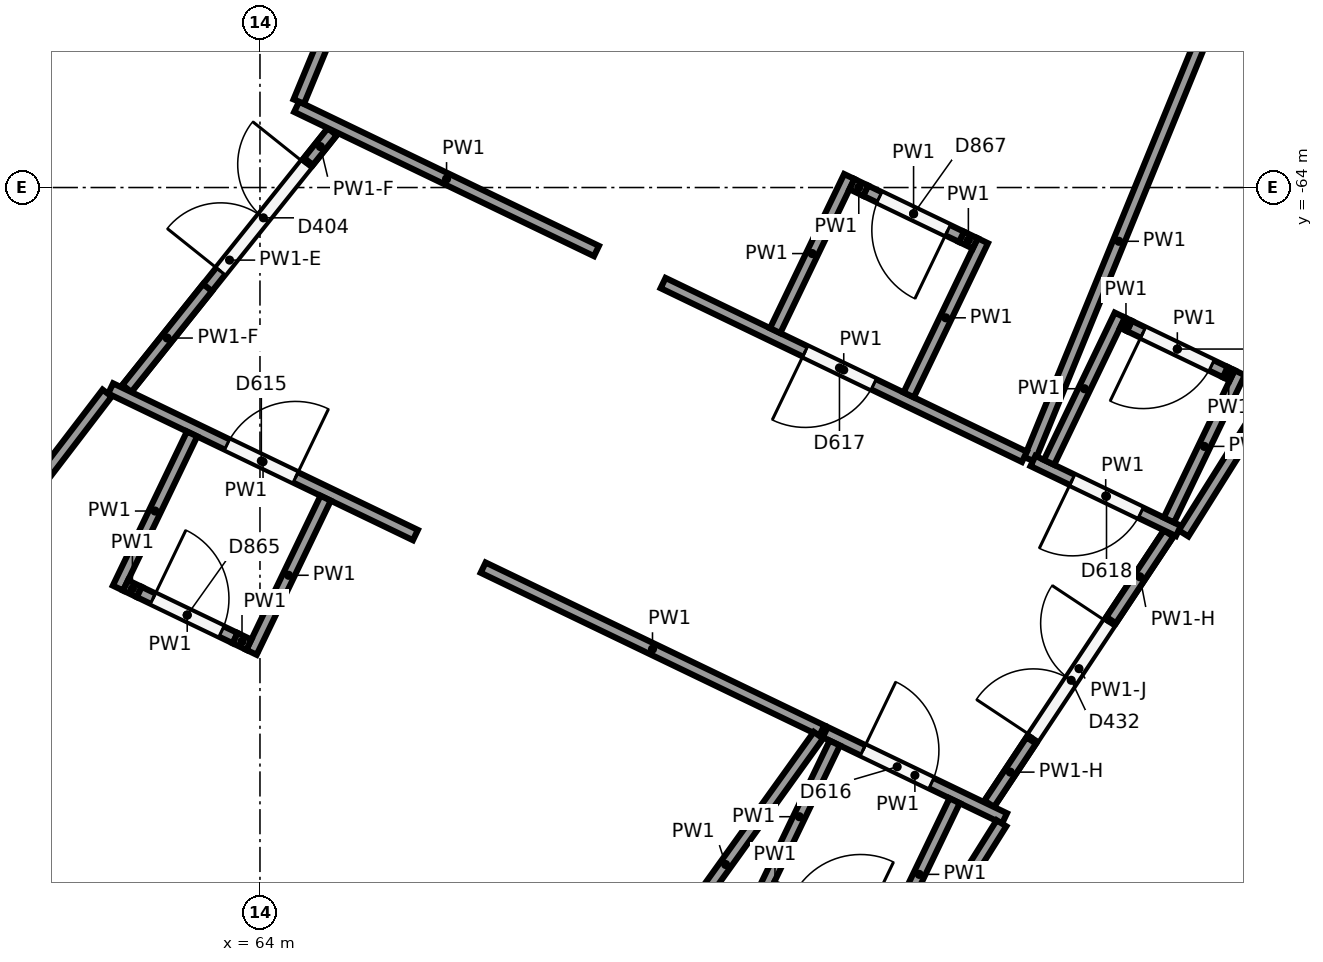
"""IFC4 building model, lengths in metres.
Left out: names, types, materials, properties, quantities, classifications, styles, units other than length and angle.
Written with IfcOpenShell. Run it as: python <this file> out.ifc"""

import sys

from ifc_helpers import new_model, si_unit, direction, frame, frame_2d, origin, origin_2d, place, context, subcontext, project, spatial, rectangle, circle, extrude, element, fill, save


model = new_model("IFC4")
c1 = context("Model", 3, precision=1e-05, world=origin(), true_north=direction((0.0, 1.0)))
c2 = subcontext(c1, "Body", "Model", "MODEL_VIEW")
j1 = project(units=[si_unit("LENGTHUNIT", "METRE"), si_unit("PLANEANGLEUNIT", "RADIAN")], contexts=[c1])
p1 = place(None, origin())
s1 = spatial("IfcSite", under=j1, at=p1, CompositionType="ELEMENT")
p2 = place(p1, origin())
s2 = spatial("IfcBuilding", under=s1, at=p2, CompositionType="ELEMENT")
p3 = place(p2, origin())
s3 = spatial("IfcBuildingStorey", under=s2, at=p3, CompositionType="ELEMENT", Elevation=0.0)
for number, where, z_axis, x_axis in (
    (1, (63.068, -73.47, 0.0), (0.0, 0.0, 1.0), (1.0, 0.0, 0.0)),
    (2, (67.972, -67.058, 0.0), (0.0, 0.0, 1.0), (1.0, 0.0, 0.0)),
):
    element("IfcColumn", number, at=place(p3, frame(where, z_axis=z_axis, x_axis=x_axis)), inside=s3, PredefinedType="COLUMN", context=c2, shape_type="SweptSolid", body=[
        extrude(circle(Radius=0.45, at=origin_2d()), origin(), (0.0, 0.0, 1.0), 6.5),
    ])
p4 = place(p3, frame((62.035, -66.644, 0.0), z_axis=(0.0, 0.0, 1.0), x_axis=(0.901212042365, -0.43337841974, 0.0)))
e3 = element("IfcWall", 3, at=p4, inside=s3, PredefinedType="PARTITIONING", context=c2, shape_type="SweptSolid", body=[
    extrude(rectangle(XDim=4.45, YDim=0.15, at=frame_2d((2.225, 0.0))), origin(), (0.0, 0.0, 1.0), 6.15),
])
p5 = place(p4, frame((1.7, 0.0, 0.0)))
e4 = element("IfcOpeningElement", 4, at=p5, cuts=e3, PredefinedType="OPENING", context=c2, shape_type="SweptSolid", body=[
    extrude(rectangle(XDim=1.0, YDim=2.1, at=frame_2d((0.5, 1.05))), frame((0.0, 0.085, 0.0), z_axis=(0.0, -1.0, 0.0), x_axis=(1.0, 0.0, 0.0)), (0.0, 0.0, 1.0), 0.17),
])
p6 = place(p3, frame((66.937, -69.001, 0.0), z_axis=(0.0, 0.0, 1.0), x_axis=(0.901185296762, -0.433434032928, 0.0)))
e5 = element("IfcWall", 5, at=p6, inside=s3, PredefinedType="PARTITIONING", context=c2, shape_type="SweptSolid", body=[
    extrude(rectangle(XDim=4.944, YDim=0.15, at=frame_2d((2.472, 0.0))), origin(), (0.0, 0.0, 1.0), 6.15),
])
p7 = place(p3, frame((71.348, -71.206, 0.0), z_axis=(0.0, 0.0, 1.0), x_axis=(-0.583304436704, -0.812253614409, 0.0)))
e6 = element("IfcWall", 6, at=p7, inside=s3, PredefinedType="PARTITIONING", context=c2, shape_type="SweptSolid", body=[
    extrude(rectangle(XDim=4.188, YDim=0.15, at=frame_2d((2.094, 0.0))), origin(), (0.0, 0.0, 1.0), 6.15),
])
p8 = place(p3, frame((59.225, -70.318, 0.0), z_axis=(0.0, 0.0, 1.0), x_axis=(0.607503889775, 0.794316702523, 0.0)))
e7 = element("IfcWall", 7, at=p8, inside=s3, PredefinedType="PARTITIONING", context=c2, shape_type="SweptSolid", body=[
    extrude(rectangle(XDim=4.549, YDim=0.15, at=frame_2d((2.275, 0.0))), origin(), (0.0, 0.0, 1.0), 6.15),
])
p9 = place(p3, frame((71.437, -71.165, 0.0), z_axis=(0.0, 0.0, 1.0), x_axis=(0.901204092293, -0.433394951556, 0.0)))
e8 = element("IfcWall", 8, at=p9, inside=s3, PredefinedType="PARTITIONING", context=c2, shape_type="SweptSolid", body=[
    extrude(rectangle(XDim=2.618, YDim=0.15, at=frame_2d((1.309, 0.0))), origin(), (0.0, 0.0, 1.0), 6.15),
])
p10 = place(p9, frame((0.55, 0.0, 0.0)))
e9 = element("IfcOpeningElement", 9, at=p10, cuts=e8, PredefinedType="OPENING", context=c2, shape_type="SweptSolid", body=[
    extrude(rectangle(XDim=1.0, YDim=2.1, at=frame_2d((0.5, 1.05))), frame((0.0, 0.085, 0.0), z_axis=(0.0, -1.0, 0.0), x_axis=(1.0, 0.0, 0.0)), (0.0, 0.0, 1.0), 0.17),
])
p11 = place(p3, frame((73.756, -72.364, 0.0), z_axis=(0.0, 0.0, 1.0), x_axis=(-0.532054374811, -0.846710187871, 0.0)))
e10 = element("IfcWall", 10, at=p11, inside=s3, PredefinedType="PARTITIONING", context=c2, shape_type="SweptSolid", body=[
    extrude(rectangle(XDim=2.731, YDim=0.15, at=frame_2d((1.366, 0.0))), origin(), (0.0, 0.0, 1.0), 6.15),
])
p12 = place(p3, frame((76.476, -61.839, 0.0), z_axis=(0.0, 0.0, 1.0), x_axis=(-0.3791112098, -0.92535111747, 0.0)))
e11 = element("IfcWall", 11, at=p12, inside=s3, PredefinedType="PARTITIONING", context=c2, shape_type="SweptSolid", body=[
    extrude(rectangle(XDim=6.2, YDim=0.15, at=frame_2d((3.1, 0.0))), origin(), (0.0, 0.0, 1.0), 6.15),
])
p13 = place(p3, frame((74.058, -67.543, 0.0), z_axis=(0.0, 0.0, 1.0), x_axis=(-0.90118985402, 0.433424557462, 0.0)))
e12 = element("IfcWall", 12, at=p13, inside=s3, PredefinedType="PARTITIONING", context=c2, shape_type="SweptSolid", body=[
    extrude(rectangle(XDim=5.275, YDim=0.15, at=frame_2d((2.638, 0.0))), origin(), (0.0, 0.0, 1.0), 6.15),
])
p14 = place(p13, frame((2.2, 0.0, 0.0)))
e13 = element("IfcOpeningElement", 13, at=p14, cuts=e12, PredefinedType="OPENING", context=c2, shape_type="SweptSolid", body=[
    extrude(rectangle(XDim=1.0, YDim=2.1, at=frame_2d((0.5, 1.05))), frame((0.0, 0.085, 0.0), z_axis=(0.0, -1.0, 0.0), x_axis=(1.0, 0.0, 0.0)), (0.0, 0.0, 1.0), 0.17),
])
p15 = place(p3, frame((68.427, -64.835, 0.0), z_axis=(0.0, 0.0, 1.0), x_axis=(-0.901214723888, 0.433372843459, 0.0)))
e14 = element("IfcWall", 14, at=p15, inside=s3, PredefinedType="PARTITIONING", context=c2, shape_type="SweptSolid", body=[
    extrude(rectangle(XDim=4.377, YDim=0.15, at=frame_2d((2.188, 0.0))), origin(), (0.0, 0.0, 1.0), 6.15),
])
p16 = place(p3, frame((64.511, -62.869, 0.0), z_axis=(0.0, 0.0, 1.0), x_axis=(0.382677430763, 0.923882018433, 0.0)))
e15 = element("IfcWall", 15, at=p16, inside=s3, PredefinedType="PARTITIONING", context=c2, shape_type="SweptSolid", body=[
    extrude(rectangle(XDim=4.591, YDim=0.15, at=frame_2d((2.295, 0.0))), origin(), (0.0, 0.0, 1.0), 6.15),
])
p17 = place(p3, frame((79.605, -63.055, 0.0), z_axis=(0.0, 0.0, 1.0), x_axis=(-0.532032873767, -0.846723698281, 0.0)))
e16 = element("IfcWall", 16, at=p17, inside=s3, PredefinedType="PARTITIONING", context=c2, shape_type="SweptSolid", body=[
    extrude(rectangle(XDim=6.49, YDim=0.15, at=frame_2d((3.245, 0.0))), origin(), (0.0, 0.0, 1.0), 6.15),
])
p18 = place(p3, frame((76.084, -68.518, 0.0), z_axis=(0.0, 0.0, 1.0), x_axis=(-0.901196299468, 0.433411155631, 0.0)))
e17 = element("IfcWall", 17, at=p18, inside=s3, PredefinedType="PARTITIONING", context=c2, shape_type="SweptSolid", body=[
    extrude(rectangle(XDim=2.124, YDim=0.15, at=frame_2d((1.062, 0.0))), origin(), (0.0, 0.0, 1.0), 6.15),
])
p19 = place(p18, frame((0.55, 0.0, 0.0)))
e18 = element("IfcOpeningElement", 18, at=p19, cuts=e17, PredefinedType="OPENING", context=c2, shape_type="SweptSolid", body=[
    extrude(rectangle(XDim=1.0, YDim=2.1, at=frame_2d((0.5, 1.05))), frame((0.0, 0.085, 0.0), z_axis=(0.0, -1.0, 0.0), x_axis=(1.0, 0.0, 0.0)), (0.0, 0.0, 1.0), 0.17),
])
p20 = place(p3, frame((63.107, -67.242, 0.0), z_axis=(0.0, 0.0, 1.0), x_axis=(-0.433358837747, -0.90122145877, 0.0)))
e19 = element("IfcWall", 19, at=p20, inside=s3, PredefinedType="PARTITIONING", context=c2, shape_type="SweptSolid", body=[
    extrude(rectangle(XDim=2.25, YDim=0.15, at=frame_2d((1.125, 0.0))), origin(), (0.0, 0.0, 1.0), 6.15),
])
p21 = place(p3, frame((64.864, -68.087, 0.0), z_axis=(0.0, 0.0, 1.0), x_axis=(-0.433401217297, -0.901201079031, 0.0)))
e20 = element("IfcWall", 20, at=p21, inside=s3, PredefinedType="PARTITIONING", context=c2, shape_type="SweptSolid", body=[
    extrude(rectangle(XDim=2.25, YDim=0.15, at=frame_2d((1.125, 0.0))), origin(), (0.0, 0.0, 1.0), 6.15),
])
p22 = place(p3, frame((62.232, -69.235, 0.0), z_axis=(0.0, 0.0, 1.0), x_axis=(0.901160703759, -0.433485162377, 0.0)))
e21 = element("IfcWall", 21, at=p22, inside=s3, PredefinedType="PARTITIONING", context=c2, shape_type="SweptSolid", body=[
    extrude(rectangle(XDim=0.2, YDim=0.15, at=frame_2d((0.1, 0.0))), origin(), (0.0, 0.0, 1.0), 6.15),
])
p23 = place(p3, frame((62.412, -69.322, 0.0), z_axis=(0.0, 0.0, 1.0), x_axis=(0.901226230947, -0.433348913294, 0.0)))
e22 = element("IfcWall", 22, at=p23, inside=s3, PredefinedType="PARTITIONING", context=c2, shape_type="SweptSolid", body=[
    extrude(rectangle(XDim=1.4, YDim=0.15, at=frame_2d((0.7, 0.0))), origin(), (0.0, 0.0, 1.0), 6.15),
])
p24 = place(p23, frame((0.2, 0.0, 0.0)))
e23 = element("IfcOpeningElement", 23, at=p24, cuts=e22, PredefinedType="OPENING", context=c2, shape_type="SweptSolid", body=[
    extrude(rectangle(XDim=1.0, YDim=2.1, at=frame_2d((0.5, 1.05))), frame((0.0, 0.085, 0.0), z_axis=(0.0, -1.0, 0.0), x_axis=(1.0, 0.0, 0.0)), (0.0, 0.0, 1.0), 0.17),
])
p25 = place(p3, frame((63.674, -69.928, 0.0), z_axis=(0.0, 0.0, 1.0), x_axis=(0.901160703759, -0.433485162377, 0.0)))
e24 = element("IfcWall", 24, at=p25, inside=s3, PredefinedType="PARTITIONING", context=c2, shape_type="SweptSolid", body=[
    extrude(rectangle(XDim=0.2, YDim=0.15, at=frame_2d((0.1, 0.0))), origin(), (0.0, 0.0, 1.0), 6.15),
])
for number, where, z_axis, x_axis in (
    (25, (71.562, -71.309, 0.0), (0.0, 0.0, 1.0), (-0.433, -0.901, 0.0)),
    (26, (73.14, -72.067, 0.0), (0.0, 0.0, 1.0), (-0.433, -0.901, 0.0)),
):
    element("IfcWall", number, at=place(p3, frame(where, z_axis=z_axis, x_axis=x_axis)), inside=s3, PredefinedType="PARTITIONING", context=c2, shape_type="SweptSolid", body=[
        extrude(rectangle(XDim=2.15, YDim=0.15, at=frame_2d((1.075, 0.0))), origin(), (0.0, 0.0, 1.0), 6.15),
    ])
p26 = place(p3, frame((70.731, -73.211, 0.0), z_axis=(0.0, 0.0, 1.0), x_axis=(0.900683407008, -0.434476006633, 0.0)))
e27 = element("IfcWall", 27, at=p26, inside=s3, PredefinedType="PARTITIONING", context=c2, shape_type="SweptSolid", body=[
    extrude(rectangle(XDim=0.1, YDim=0.15, at=frame_2d((0.05, 0.0))), origin(), (0.0, 0.0, 1.0), 6.15),
])
p27 = place(p3, frame((72.535, -66.728, 0.0), z_axis=(0.0, 0.0, 1.0), x_axis=(0.433401217297, 0.901201079031, 0.0)))
e28 = element("IfcWall", 28, at=p27, inside=s3, PredefinedType="PARTITIONING", context=c2, shape_type="SweptSolid", body=[
    extrude(rectangle(XDim=2.25, YDim=0.15, at=frame_2d((1.125, 0.0))), origin(), (0.0, 0.0, 1.0), 6.15),
])
p28 = place(p3, frame((70.778, -65.883, 0.0), z_axis=(0.0, 0.0, 1.0), x_axis=(0.433446957245, 0.901179080569, 0.0)))
e29 = element("IfcWall", 29, at=p28, inside=s3, PredefinedType="PARTITIONING", context=c2, shape_type="SweptSolid", body=[
    extrude(rectangle(XDim=2.25, YDim=0.15, at=frame_2d((1.125, 0.0))), origin(), (0.0, 0.0, 1.0), 6.15),
])
p29 = place(p3, frame((73.41, -64.735, 0.0), z_axis=(0.0, 0.0, 1.0), x_axis=(-0.901160703759, 0.433485162377, 0.0)))
e30 = element("IfcWall", 30, at=p29, inside=s3, PredefinedType="PARTITIONING", context=c2, shape_type="SweptSolid", body=[
    extrude(rectangle(XDim=0.2, YDim=0.15, at=frame_2d((0.1, 0.0))), origin(), (0.0, 0.0, 1.0), 6.15),
])
p30 = place(p3, frame((73.23, -64.649, 0.0), z_axis=(0.0, 0.0, 1.0), x_axis=(-0.901158119361, 0.433490534971, 0.0)))
e31 = element("IfcWall", 31, at=p30, inside=s3, PredefinedType="PARTITIONING", context=c2, shape_type="SweptSolid", body=[
    extrude(rectangle(XDim=1.4, YDim=0.15, at=frame_2d((0.7, 0.0))), origin(), (0.0, 0.0, 1.0), 6.15),
])
p31 = place(p30, frame((0.2, 0.0, 0.0)))
e32 = element("IfcOpeningElement", 32, at=p31, cuts=e31, PredefinedType="OPENING", context=c2, shape_type="SweptSolid", body=[
    extrude(rectangle(XDim=1.0, YDim=2.1, at=frame_2d((0.5, 1.05))), frame((0.0, 0.085, 0.0), z_axis=(0.0, -1.0, 0.0), x_axis=(1.0, 0.0, 0.0)), (0.0, 0.0, 1.0), 0.17),
])
p32 = place(p3, frame((71.969, -64.042, 0.0), z_axis=(0.0, 0.0, 1.0), x_axis=(-0.901160703759, 0.433485162377, 0.0)))
e33 = element("IfcWall", 33, at=p32, inside=s3, PredefinedType="PARTITIONING", context=c2, shape_type="SweptSolid", body=[
    extrude(rectangle(XDim=0.2, YDim=0.15, at=frame_2d((0.1, 0.0))), origin(), (0.0, 0.0, 1.0), 6.15),
])
for number, where, z_axis, x_axis in (
    (34, (75.959, -68.375, 0.0), (0.0, 0.0, 1.0), (0.433, 0.901, 0.0)),
    (35, (74.382, -67.616, 0.0), (0.0, 0.0, 1.0), (0.433, 0.901, 0.0)),
):
    element("IfcWall", number, at=place(p3, frame(where, z_axis=z_axis, x_axis=x_axis)), inside=s3, PredefinedType="PARTITIONING", context=c2, shape_type="SweptSolid", body=[
        extrude(rectangle(XDim=2.15, YDim=0.15, at=frame_2d((1.075, 0.0))), origin(), (0.0, 0.0, 1.0), 6.15),
    ])
p33 = place(p3, frame((76.791, -66.472, 0.0), z_axis=(0.0, 0.0, 1.0), x_axis=(-0.900683407008, 0.434476006633, 0.0)))
e36 = element("IfcWall", 36, at=p33, inside=s3, PredefinedType="PARTITIONING", context=c2, shape_type="SweptSolid", body=[
    extrude(rectangle(XDim=0.1, YDim=0.15, at=frame_2d((0.05, 0.0))), origin(), (0.0, 0.0, 1.0), 6.15),
])
p34 = place(p3, frame((76.701, -66.428, 0.0), z_axis=(0.0, 0.0, 1.0), x_axis=(-0.901226230947, 0.433348913294, 0.0)))
e37 = element("IfcWall", 37, at=p34, inside=s3, PredefinedType="PARTITIONING", context=c2, shape_type="SweptSolid", body=[
    extrude(rectangle(XDim=1.4, YDim=0.15, at=frame_2d((0.7, 0.0))), origin(), (0.0, 0.0, 1.0), 6.15),
])
p35 = place(p34, frame((0.2, 0.0, 0.0)))
e38 = element("IfcOpeningElement", 38, at=p35, cuts=e37, PredefinedType="OPENING", context=c2, shape_type="SweptSolid", body=[
    extrude(rectangle(XDim=1.0, YDim=2.1, at=frame_2d((0.5, 1.05))), frame((0.0, 0.085, 0.0), z_axis=(0.0, -1.0, 0.0), x_axis=(1.0, 0.0, 0.0)), (0.0, 0.0, 1.0), 0.17),
])
p36 = place(p3, frame((75.439, -65.822, 0.0), z_axis=(0.0, 0.0, 1.0), x_axis=(-0.900683407008, 0.434476006633, 0.0)))
e39 = element("IfcWall", 39, at=p36, inside=s3, PredefinedType="PARTITIONING", context=c2, shape_type="SweptSolid", body=[
    extrude(rectangle(XDim=0.1, YDim=0.15, at=frame_2d((0.05, 0.0))), origin(), (0.0, 0.0, 1.0), 6.15),
])
p37 = place(p3, frame((73.595, -72.108, 0.0), z_axis=(0.0, 0.0, 1.0), x_axis=(0.552890314707, 0.833254042837, 0.0)))
e40 = element("IfcWall", 40, at=p37, inside=s3, PredefinedType="PARTITIONING", context=c2, shape_type="SweptSolid", body=[
    extrude(rectangle(XDim=4.268, YDim=0.15, at=frame_2d((2.134, 0.0))), origin(), (0.0, 0.0, 1.0), 5.05),
])
p38 = place(p37, frame((1.05, 0.0, 0.0)))
e41 = element("IfcOpeningElement", 41, at=p38, cuts=e40, PredefinedType="OPENING", context=c2, shape_type="SweptSolid", body=[
    extrude(rectangle(XDim=1.8, YDim=2.1, at=frame_2d((0.9, 1.05))), frame((0.0, 0.085, 0.0), z_axis=(0.0, -1.0, 0.0), x_axis=(1.0, 0.0, 0.0)), (0.0, 0.0, 1.0), 0.17),
])
p39 = place(p3, frame((73.595, -72.108, 5.05), z_axis=(0.0, 0.0, 1.0), x_axis=(0.552782992552, 0.833325244514, 0.0)))
e42 = element("IfcWall", 42, at=p39, inside=s3, PredefinedType="PARTITIONING", context=c2, shape_type="SweptSolid", body=[
    extrude(rectangle(XDim=1.0, YDim=0.15, at=frame_2d((0.5, 0.0))), origin(), (0.0, 0.0, 1.0), 1.1),
])
p40 = place(p3, frame((75.199, -69.691, 5.05), z_axis=(0.0, 0.0, 1.0), x_axis=(0.552845063211, 0.833284066861, 0.0)))
e43 = element("IfcWall", 43, at=p40, inside=s3, PredefinedType="PARTITIONING", context=c2, shape_type="SweptSolid", body=[
    extrude(rectangle(XDim=1.368, YDim=0.15, at=frame_2d((0.684, 0.0))), origin(), (0.0, 0.0, 1.0), 1.1),
])
p41 = place(p3, frame((62.249, -66.644, 0.0), z_axis=(0.0, 0.0, 1.0), x_axis=(0.624681279042, 0.780879824054, 0.0)))
e44 = element("IfcWall", 44, at=p41, inside=s3, PredefinedType="PARTITIONING", context=c2, shape_type="SweptSolid", body=[
    extrude(rectangle(XDim=4.325, YDim=0.15, at=frame_2d((2.163, 0.0))), origin(), (0.0, 0.0, 1.0), 5.25),
])
p42 = place(p41, frame((1.975, 0.0, 0.0)))
e45 = element("IfcOpeningElement", 45, at=p42, cuts=e44, PredefinedType="OPENING", context=c2, shape_type="SweptSolid", body=[
    extrude(rectangle(XDim=1.8, YDim=2.1, at=frame_2d((0.9, 1.05))), frame((0.0, 0.085, 0.0), z_axis=(0.0, -1.0, 0.0), x_axis=(1.0, 0.0, 0.0)), (0.0, 0.0, 1.0), 0.17),
])
p43 = place(p3, frame((64.638, -63.657, 5.25), z_axis=(0.0, 0.0, 1.0), x_axis=(0.624635487442, 0.780916453808, 0.0)))
e46 = element("IfcWall", 46, at=p43, inside=s3, PredefinedType="PARTITIONING", context=c2, shape_type="SweptSolid", body=[
    extrude(rectangle(XDim=0.5, YDim=0.15, at=frame_2d((0.25, 0.0))), origin(), (0.0, 0.0, 1.0), 0.9),
])
p44 = place(p3, frame((62.249, -66.644, 5.25), z_axis=(0.0, 0.0, 1.0), x_axis=(0.624677522625, 0.780882829064, 0.0)))
e47 = element("IfcWall", 47, at=p44, inside=s3, PredefinedType="PARTITIONING", context=c2, shape_type="SweptSolid", body=[
    extrude(rectangle(XDim=1.699, YDim=0.15, at=frame_2d((0.85, 0.0))), origin(), (0.0, 0.0, 1.0), 0.9),
])
p45 = place(p5, origin())
e48 = element("IfcDoor", 48, at=p45, inside=s3, OperationType="SINGLE_SWING_RIGHT", PredefinedType="DOOR", context=c2, shape_type="SweptSolid", body=[
    extrude(rectangle(XDim=1.0, YDim=2.1, at=frame_2d((0.5, 1.05))), frame((0.0, 0.025, 0.0), z_axis=(0.0, -1.0, 0.0), x_axis=(1.0, 0.0, 0.0)), (0.0, 0.0, 1.0), 0.05),
])
fill(e4, e48)
p46 = place(p10, origin())
e49 = element("IfcDoor", 49, at=p46, inside=s3, OperationType="SINGLE_SWING_LEFT", PredefinedType="DOOR", context=c2, shape_type="SweptSolid", body=[
    extrude(rectangle(XDim=1.0, YDim=2.1, at=frame_2d((0.5, 1.05))), frame((0.0, 0.025, 0.0), z_axis=(0.0, -1.0, 0.0), x_axis=(1.0, 0.0, 0.0)), (0.0, 0.0, 1.0), 0.05),
])
fill(e9, e49)
p47 = place(p14, origin())
e50 = element("IfcDoor", 50, at=p47, inside=s3, OperationType="SINGLE_SWING_RIGHT", PredefinedType="DOOR", context=c2, shape_type="SweptSolid", body=[
    extrude(rectangle(XDim=1.0, YDim=2.1, at=frame_2d((0.5, 1.05))), frame((0.0, 0.025, 0.0), z_axis=(0.0, -1.0, 0.0), x_axis=(1.0, 0.0, 0.0)), (0.0, 0.0, 1.0), 0.05),
])
fill(e13, e50)
p48 = place(p19, origin())
e51 = element("IfcDoor", 51, at=p48, inside=s3, OperationType="SINGLE_SWING_RIGHT", PredefinedType="DOOR", context=c2, shape_type="SweptSolid", body=[
    extrude(rectangle(XDim=1.0, YDim=2.1, at=frame_2d((0.5, 1.05))), frame((0.0, 0.025, 0.0), z_axis=(0.0, -1.0, 0.0), x_axis=(1.0, 0.0, 0.0)), (0.0, 0.0, 1.0), 0.05),
])
fill(e18, e51)
p49 = place(p24, origin())
e52 = element("IfcDoor", 52, at=p49, inside=s3, OperationType="SINGLE_SWING_LEFT", PredefinedType="DOOR", context=c2, shape_type="SweptSolid", body=[
    extrude(rectangle(XDim=1.0, YDim=2.1, at=frame_2d((0.5, 1.05))), frame((0.0, 0.025, 0.0), z_axis=(0.0, -1.0, 0.0), x_axis=(1.0, 0.0, 0.0)), (0.0, 0.0, 1.0), 0.05),
])
fill(e23, e52)
p50 = place(p31, origin())
e53 = element("IfcDoor", 53, at=p50, inside=s3, OperationType="SINGLE_SWING_LEFT", PredefinedType="DOOR", context=c2, shape_type="SweptSolid", body=[
    extrude(rectangle(XDim=1.0, YDim=2.1, at=frame_2d((0.5, 1.05))), frame((0.0, 0.025, 0.0), z_axis=(0.0, -1.0, 0.0), x_axis=(1.0, 0.0, 0.0)), (0.0, 0.0, 1.0), 0.05),
])
fill(e32, e53)
p51 = place(p35, origin())
e54 = element("IfcDoor", 54, at=p51, inside=s3, OperationType="SINGLE_SWING_RIGHT", PredefinedType="DOOR", context=c2, shape_type="SweptSolid", body=[
    extrude(rectangle(XDim=1.0, YDim=2.1, at=frame_2d((0.5, 1.05))), frame((0.0, 0.025, 0.0), z_axis=(0.0, -1.0, 0.0), x_axis=(1.0, 0.0, 0.0)), (0.0, 0.0, 1.0), 0.05),
])
fill(e38, e54)
p52 = place(p38, origin())
e55 = element("IfcDoor", 55, at=p52, inside=s3, OperationType="DOUBLE_DOOR_SINGLE_SWING", PredefinedType="DOOR", context=c2, shape_type="SweptSolid", body=[
    extrude(rectangle(XDim=1.8, YDim=2.1, at=frame_2d((0.9, 1.05))), frame((0.0, 0.025, 0.0), z_axis=(0.0, -1.0, 0.0), x_axis=(1.0, 0.0, 0.0)), (0.0, 0.0, 1.0), 0.05),
])
fill(e41, e55)
p53 = place(p42, origin())
e56 = element("IfcDoor", 56, at=p53, inside=s3, OperationType="DOUBLE_DOOR_SINGLE_SWING", PredefinedType="DOOR", context=c2, shape_type="SweptSolid", body=[
    extrude(rectangle(XDim=1.8, YDim=2.1, at=frame_2d((0.9, 1.05))), frame((0.0, 0.025, 0.0), z_axis=(0.0, -1.0, 0.0), x_axis=(1.0, 0.0, 0.0)), (0.0, 0.0, 1.0), 0.05),
])
fill(e45, e56)
save(model, sys.argv[1])
